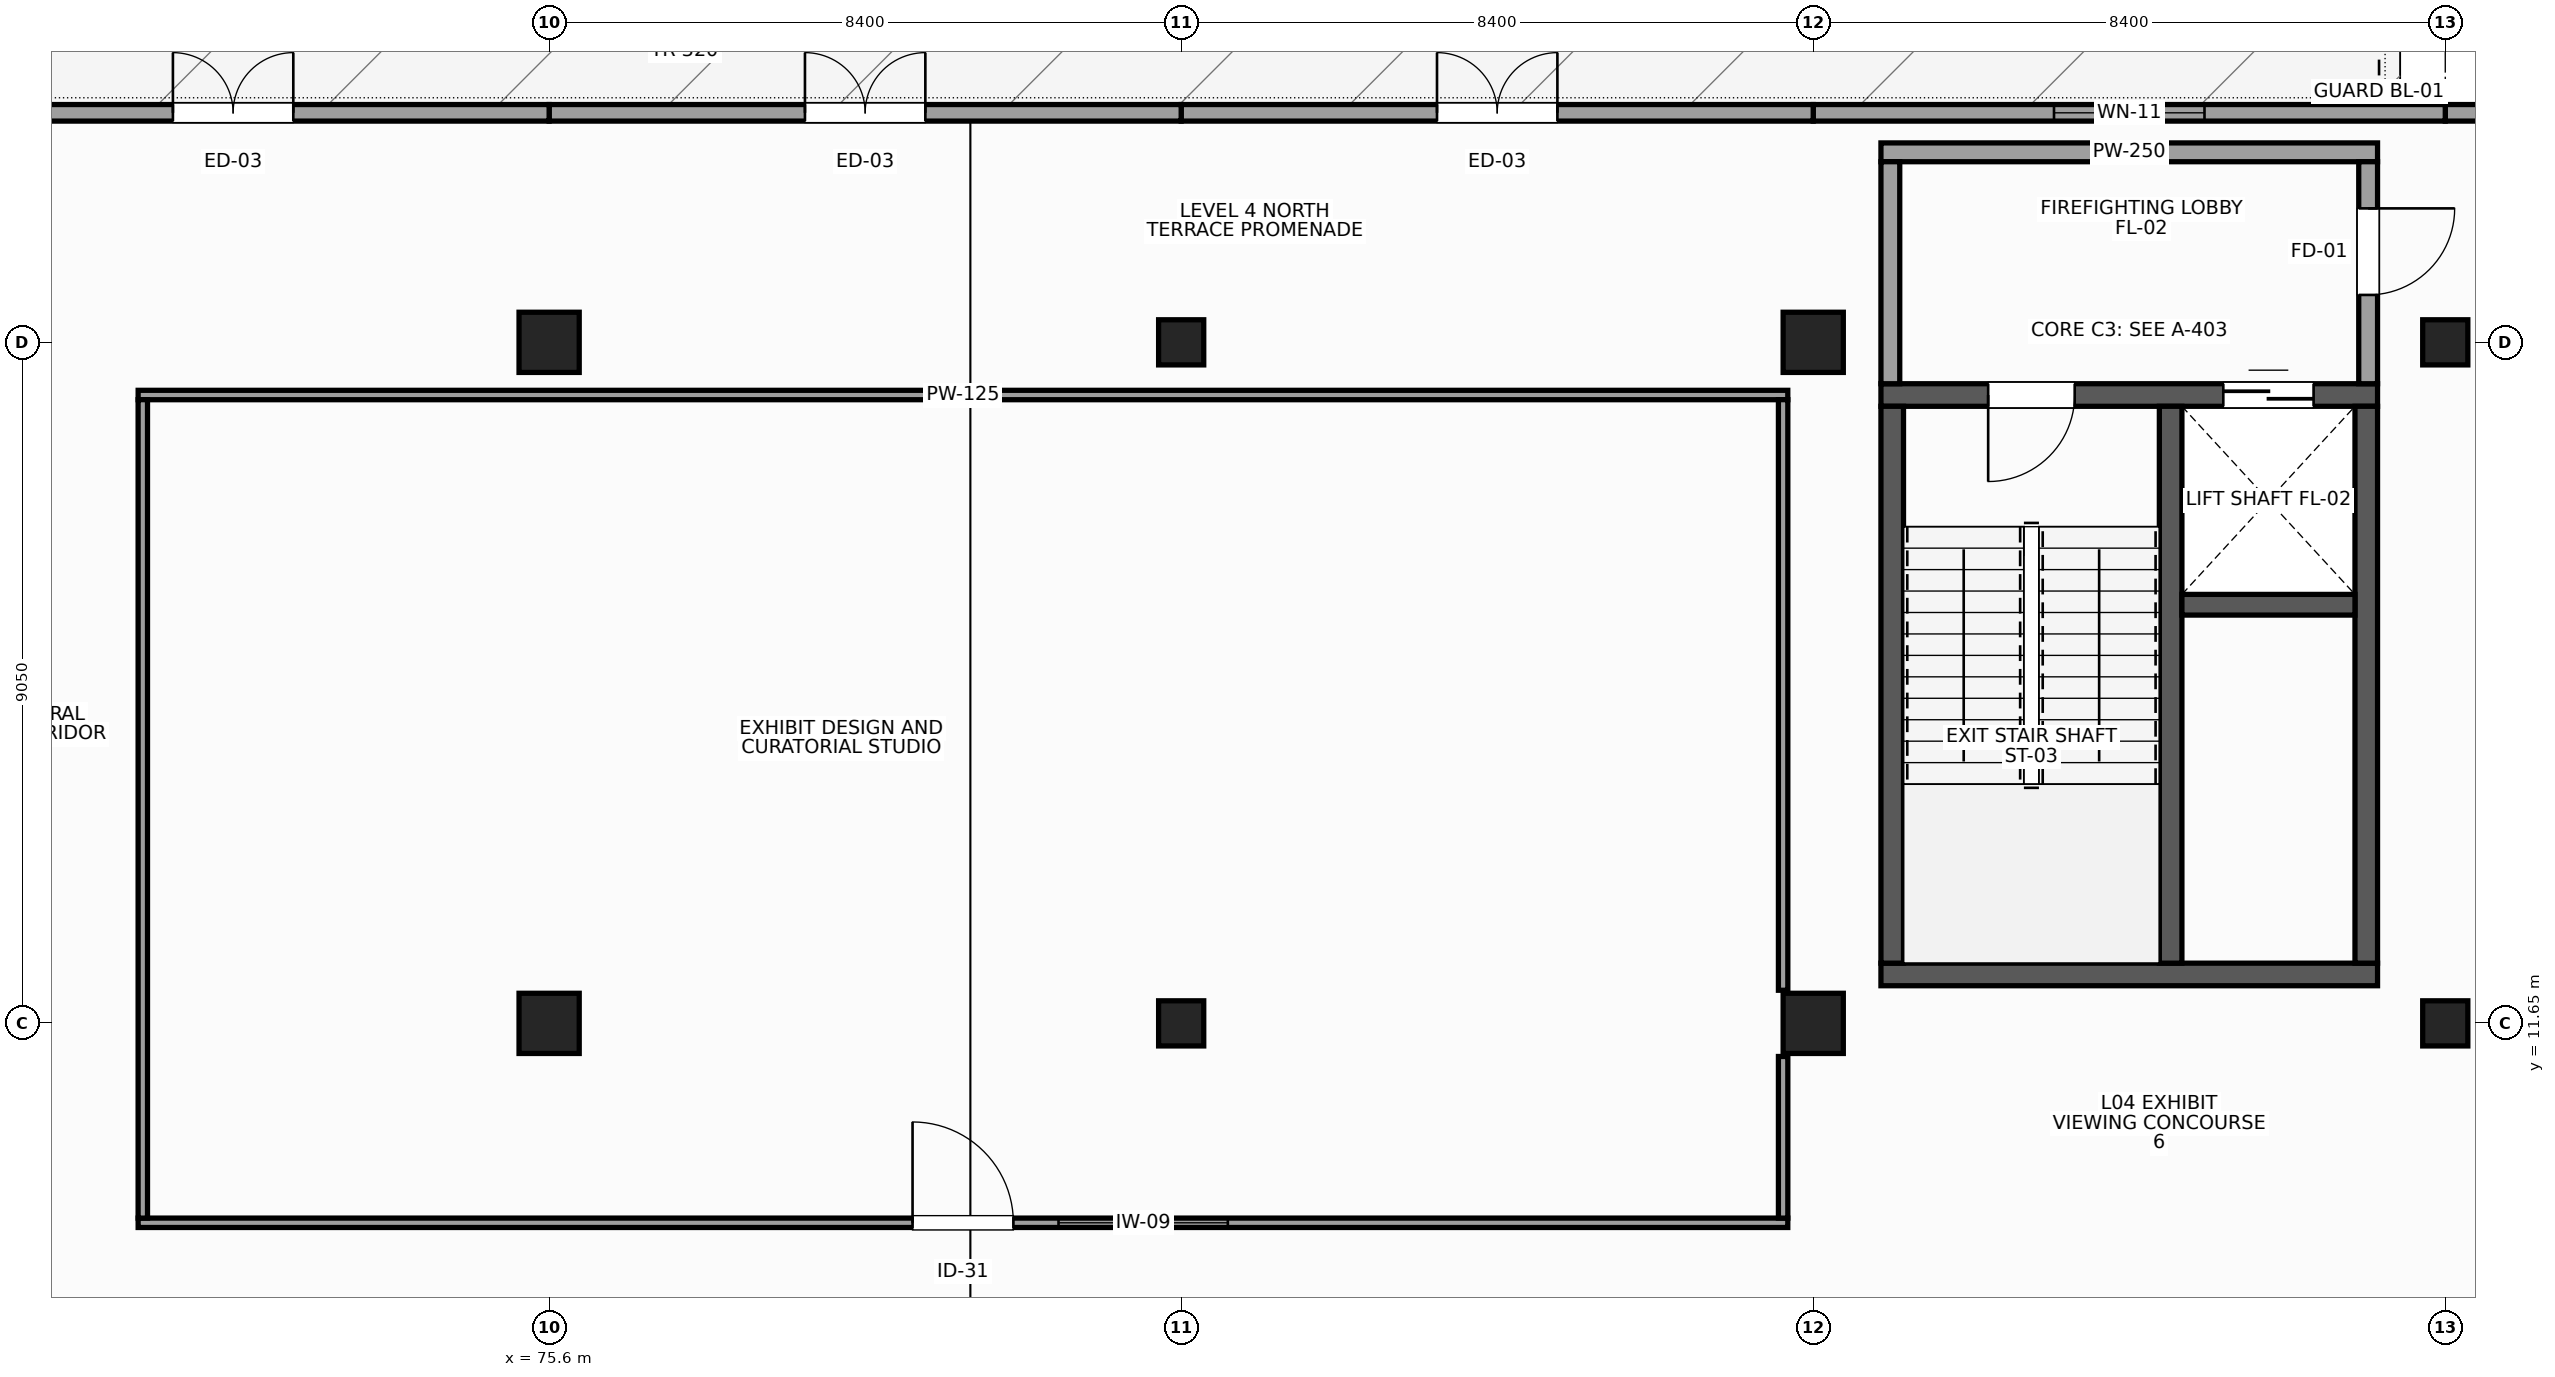
"""IFC4 building model, lengths in metres.
Left out: names, types, materials, properties, quantities, classifications, styles, units other than length and angle.
Written with IfcOpenShell. Run it as: python <this file> out.ifc"""

import sys

from ifc_helpers import new_model, si_unit, direction, frame, frame_2d, origin, origin_2d, place, context, subcontext, project, spatial, rectangle, extrude, element, fill, save


model = new_model("IFC4")
c1 = context("Model", 3, precision=1e-05, world=origin(), true_north=direction((0.0, 1.0)))
c2 = subcontext(c1, "Body", "Model", "MODEL_VIEW")
j1 = project(units=[si_unit("LENGTHUNIT", "METRE"), si_unit("PLANEANGLEUNIT", "RADIAN")], contexts=[c1])
p1 = place(None, origin())
s1 = spatial("IfcSite", under=j1, at=p1, CompositionType="ELEMENT")
p2 = place(p1, origin())
s2 = spatial("IfcBuilding", under=s1, at=p2, CompositionType="ELEMENT")
p3 = place(p2, frame((0.0, 0.0, 20.1)))
s3 = spatial("IfcBuildingStorey", under=s2, at=p3, CompositionType="ELEMENT", Elevation=20.1)
p4 = place(p3, frame((75.6, 11.65, 0.0), z_axis=(0.0, 0.0, 1.0), x_axis=(1.0, 0.0, 0.0)))
e1 = element("IfcColumn", 1, at=p4, inside=s3, PredefinedType="COLUMN", context=c2, shape_type="SweptSolid", body=[
    extrude(rectangle(XDim=0.8, YDim=0.8, at=origin_2d()), origin(), (0.0, 0.0, 1.0), 3.75),
])
p5 = place(p3, frame((75.6, 20.7, 0.0), z_axis=(0.0, 0.0, 1.0), x_axis=(1.0, 0.0, 0.0)))
e2 = element("IfcColumn", 2, at=p5, inside=s3, PredefinedType="COLUMN", context=c2, shape_type="SweptSolid", body=[
    extrude(rectangle(XDim=0.8, YDim=0.8, at=origin_2d()), origin(), (0.0, 0.0, 1.0), 4.2),
])
for number, where, z_axis, x_axis in (
    (3, (84.0, 11.65, 0.0), (0.0, 0.0, 1.0), (1.0, 0.0, 0.0)),
    (4, (84.0, 20.7, 0.0), (0.0, 0.0, 1.0), (1.0, 0.0, 0.0)),
):
    element("IfcColumn", number, at=place(p3, frame(where, z_axis=z_axis, x_axis=x_axis)), inside=s3, PredefinedType="COLUMN", context=c2, shape_type="SweptSolid", body=[
        extrude(rectangle(XDim=0.6, YDim=0.6, at=origin_2d()), origin(), (0.0, 0.0, 1.0), 4.5),
    ])
p6 = place(p3, frame((92.4, 11.65, 0.0), z_axis=(0.0, 0.0, 1.0), x_axis=(1.0, 0.0, 0.0)))
e5 = element("IfcColumn", 5, at=p6, inside=s3, PredefinedType="COLUMN", context=c2, shape_type="SweptSolid", body=[
    extrude(rectangle(XDim=0.8, YDim=0.8, at=origin_2d()), origin(), (0.0, 0.0, 1.0), 3.75),
])
p7 = place(p3, frame((92.4, 20.7, 0.0), z_axis=(0.0, 0.0, 1.0), x_axis=(1.0, 0.0, 0.0)))
e6 = element("IfcColumn", 6, at=p7, inside=s3, PredefinedType="COLUMN", context=c2, shape_type="SweptSolid", body=[
    extrude(rectangle(XDim=0.8, YDim=0.8, at=origin_2d()), origin(), (0.0, 0.0, 1.0), 4.2),
])
for number, where, z_axis, x_axis in (
    (7, (100.8, 11.65, 0.0), (0.0, 0.0, 1.0), (1.0, 0.0, 0.0)),
    (8, (100.8, 20.7, 0.0), (0.0, 0.0, 1.0), (1.0, 0.0, 0.0)),
):
    element("IfcColumn", number, at=place(p3, frame(where, z_axis=z_axis, x_axis=x_axis)), inside=s3, PredefinedType="COLUMN", context=c2, shape_type="SweptSolid", body=[
        extrude(rectangle(XDim=0.6, YDim=0.6, at=origin_2d()), origin(), (0.0, 0.0, 1.0), 4.5),
    ])
p8 = place(p3, frame((109.2, 23.75, 0.0), z_axis=(0.0, 0.0, 1.0), x_axis=(-1.0, 0.0, 0.0)))
e9 = element("IfcWall", 9, at=p8, inside=s3, PredefinedType="STANDARD", context=c2, shape_type="SweptSolid", body=[
    extrude(rectangle(XDim=8.4, YDim=0.22, at=frame_2d((4.2, 0.0))), origin(), (0.0, 0.0, 1.0), 3.428),
])
p9 = place(p8, frame((2.85, 0.0, 0.95)))
e10 = element("IfcOpeningElement", 10, at=p9, cuts=e9, PredefinedType="OPENING", context=c2, shape_type="SweptSolid", body=[
    extrude(rectangle(XDim=2.7, YDim=2.0, at=frame_2d((1.35, 1.0))), frame((0.0, 0.12, 0.0), z_axis=(0.0, -1.0, 0.0), x_axis=(1.0, 0.0, 0.0)), (0.0, 0.0, 1.0), 0.24),
])
p10 = place(p3, frame((100.8, 23.75, 0.0), z_axis=(0.0, 0.0, 1.0), x_axis=(-1.0, 0.0, 0.0)))
e11 = element("IfcWall", 11, at=p10, inside=s3, PredefinedType="STANDARD", context=c2, shape_type="SweptSolid", body=[
    extrude(rectangle(XDim=8.4, YDim=0.22, at=frame_2d((4.2, 0.0))), origin(), (0.0, 0.0, 1.0), 3.428),
])
p11 = place(p10, frame((3.2, 0.0, 0.95)))
e12 = element("IfcOpeningElement", 12, at=p11, cuts=e11, PredefinedType="OPENING", context=c2, shape_type="SweptSolid", body=[
    extrude(rectangle(XDim=2.0, YDim=1.5, at=frame_2d((1.0, 0.75))), frame((0.0, 0.12, 0.0), z_axis=(0.0, -1.0, 0.0), x_axis=(1.0, 0.0, 0.0)), (0.0, 0.0, 1.0), 0.24),
])
p12 = place(p3, frame((92.4, 23.75, 0.0), z_axis=(0.0, 0.0, 1.0), x_axis=(-1.0, 0.0, 0.0)))
e13 = element("IfcWall", 13, at=p12, inside=s3, PredefinedType="STANDARD", context=c2, shape_type="SweptSolid", body=[
    extrude(rectangle(XDim=8.4, YDim=0.22, at=frame_2d((4.2, 0.0))), origin(), (0.0, 0.0, 1.0), 3.428),
])
p13 = place(p12, frame((3.4, 0.0, 0.0)))
e14 = element("IfcOpeningElement", 14, at=p13, cuts=e13, PredefinedType="OPENING", context=c2, shape_type="SweptSolid", body=[
    extrude(rectangle(XDim=1.6, YDim=2.25, at=frame_2d((0.8, 1.125))), frame((0.0, 0.12, 0.0), z_axis=(0.0, -1.0, 0.0), x_axis=(1.0, 0.0, 0.0)), (0.0, 0.0, 1.0), 0.24),
])
p14 = place(p3, frame((84.0, 23.75, 0.0), z_axis=(0.0, 0.0, 1.0), x_axis=(-1.0, 0.0, 0.0)))
e15 = element("IfcWall", 15, at=p14, inside=s3, PredefinedType="STANDARD", context=c2, shape_type="SweptSolid", body=[
    extrude(rectangle(XDim=8.4, YDim=0.22, at=frame_2d((4.2, 0.0))), origin(), (0.0, 0.0, 1.0), 3.428),
])
p15 = place(p14, frame((3.4, 0.0, 0.0)))
e16 = element("IfcOpeningElement", 16, at=p15, cuts=e15, PredefinedType="OPENING", context=c2, shape_type="SweptSolid", body=[
    extrude(rectangle(XDim=1.6, YDim=2.25, at=frame_2d((0.8, 1.125))), frame((0.0, 0.12, 0.0), z_axis=(0.0, -1.0, 0.0), x_axis=(1.0, 0.0, 0.0)), (0.0, 0.0, 1.0), 0.24),
])
p16 = place(p3, frame((75.6, 23.75, 0.0), z_axis=(0.0, 0.0, 1.0), x_axis=(-1.0, 0.0, 0.0)))
e17 = element("IfcWall", 17, at=p16, inside=s3, PredefinedType="STANDARD", context=c2, shape_type="SweptSolid", body=[
    extrude(rectangle(XDim=8.4, YDim=0.22, at=frame_2d((4.2, 0.0))), origin(), (0.0, 0.0, 1.0), 3.428),
])
p17 = place(p16, frame((3.4, 0.0, 0.0)))
e18 = element("IfcOpeningElement", 18, at=p17, cuts=e17, PredefinedType="OPENING", context=c2, shape_type="SweptSolid", body=[
    extrude(rectangle(XDim=1.6, YDim=2.25, at=frame_2d((0.8, 1.125))), frame((0.0, 0.12, 0.0), z_axis=(0.0, -1.0, 0.0), x_axis=(1.0, 0.0, 0.0)), (0.0, 0.0, 1.0), 0.24),
])
p18 = place(p3, frame((93.3, 12.3, 0.0), z_axis=(0.0, 0.0, 1.0), x_axis=(1.0, 0.0, 0.0)))
e19 = element("IfcWall", 19, at=p18, inside=s3, PredefinedType="SHEAR", context=c2, shape_type="SweptSolid", body=[
    extrude(rectangle(XDim=6.6, YDim=0.3, at=frame_2d((3.3, 0.0))), origin(), (0.0, 0.0, 1.0), 4.2),
])
p19 = place(p3, frame((93.3, 20.0, 0.0), z_axis=(0.0, 0.0, 1.0), x_axis=(1.0, 0.0, 0.0)))
e20 = element("IfcWall", 20, at=p19, inside=s3, PredefinedType="SHEAR", context=c2, shape_type="SweptSolid", body=[
    extrude(rectangle(XDim=6.6, YDim=0.3, at=frame_2d((3.3, 0.0))), origin(), (0.0, 0.0, 1.0), 4.2),
])
p20 = place(p19, frame((1.425, 0.0, 0.0)))
e21 = element("IfcOpeningElement", 21, at=p20, cuts=e20, PredefinedType="OPENING", context=c2, shape_type="SweptSolid", body=[
    extrude(rectangle(XDim=1.15, YDim=2.2, at=frame_2d((0.575, 1.1))), frame((0.0, 0.16, 0.0), z_axis=(0.0, -1.0, 0.0), x_axis=(1.0, 0.0, 0.0)), (0.0, 0.0, 1.0), 0.32),
])
p21 = place(p19, frame((4.55, 0.0, 0.0)))
e22 = element("IfcOpeningElement", 22, at=p21, cuts=e20, PredefinedType="OPENING", context=c2, shape_type="SweptSolid", body=[
    extrude(rectangle(XDim=1.2, YDim=2.15, at=frame_2d((0.6, 1.075))), frame((0.0, 0.16, 0.0), z_axis=(0.0, -1.0, 0.0), x_axis=(1.0, 0.0, 0.0)), (0.0, 0.0, 1.0), 0.32),
])
for number, where, z_axis, x_axis in (
    (23, (93.45, 12.45, 0.0), (0.0, 0.0, 1.0), (0.0, 1.0, 0.0)),
    (24, (99.75, 12.45, 0.0), (0.0, 0.0, 1.0), (0.0, 1.0, 0.0)),
    (25, (97.15, 12.45, 0.0), (0.0, 0.0, 1.0), (0.0, 1.0, 0.0)),
):
    element("IfcWall", number, at=place(p3, frame(where, z_axis=z_axis, x_axis=x_axis)), inside=s3, PredefinedType="SHEAR", context=c2, shape_type="SweptSolid", body=[
        extrude(rectangle(XDim=7.4, YDim=0.3, at=frame_2d((3.7, 0.0))), origin(), (0.0, 0.0, 1.0), 4.2),
    ])
p22 = place(p3, frame((97.3, 17.213, 0.0), z_axis=(0.0, 0.0, 1.0), x_axis=(1.0, 0.0, 0.0)))
e26 = element("IfcWall", 26, at=p22, inside=s3, PredefinedType="SHEAR", context=c2, shape_type="SweptSolid", body=[
    extrude(rectangle(XDim=2.3, YDim=0.275, at=frame_2d((1.15, 0.0))), origin(), (0.0, 0.0, 1.0), 4.2),
])
p23 = place(p3, frame((93.3, 23.225, 0.0), z_axis=(0.0, 0.0, 1.0), x_axis=(1.0, 0.0, 0.0)))
e27 = element("IfcWall", 27, at=p23, inside=s3, PredefinedType="PARTITIONING", context=c2, shape_type="SweptSolid", body=[
    extrude(rectangle(XDim=6.6, YDim=0.25, at=frame_2d((3.3, 0.0))), origin(), (0.0, 0.0, 1.0), 4.2),
])
p24 = place(p3, frame((93.425, 20.15, 0.0), z_axis=(0.0, 0.0, 1.0), x_axis=(0.0, 1.0, 0.0)))
e28 = element("IfcWall", 28, at=p24, inside=s3, PredefinedType="PARTITIONING", context=c2, shape_type="SweptSolid", body=[
    extrude(rectangle(XDim=2.95, YDim=0.25, at=frame_2d((1.475, 0.0))), origin(), (0.0, 0.0, 1.0), 4.2),
])
p25 = place(p3, frame((99.775, 20.15, 0.0), z_axis=(0.0, 0.0, 1.0), x_axis=(0.0, 1.0, 0.0)))
e29 = element("IfcWall", 29, at=p25, inside=s3, PredefinedType="PARTITIONING", context=c2, shape_type="SweptSolid", body=[
    extrude(rectangle(XDim=2.95, YDim=0.25, at=frame_2d((1.475, 0.0))), origin(), (0.0, 0.0, 1.0), 3.783),
])
p26 = place(p25, frame((1.18, 0.0, 0.0)))
e30 = element("IfcOpeningElement", 30, at=p26, cuts=e29, PredefinedType="OPENING", context=c2, shape_type="SweptSolid", body=[
    extrude(rectangle(XDim=1.15, YDim=2.2, at=frame_2d((0.575, 1.1))), frame((0.0, 0.135, 0.0), z_axis=(0.0, -1.0, 0.0), x_axis=(1.0, 0.0, 0.0)), (0.0, 0.0, 1.0), 0.27),
])
p27 = place(p3, frame((70.138, 9.0, 0.0), z_axis=(0.0, 0.0, 1.0), x_axis=(1.0, 0.0, 0.0)))
e31 = element("IfcWall", 31, at=p27, inside=s3, PredefinedType="PARTITIONING", context=c2, shape_type="SweptSolid", body=[
    extrude(rectangle(XDim=21.924, YDim=0.125, at=frame_2d((10.962, 0.0))), origin(), (0.0, 0.0, 1.0), 4.2),
])
p28 = place(p27, frame((10.292, 0.0, 0.0)))
e32 = element("IfcOpeningElement", 32, at=p28, cuts=e31, PredefinedType="OPENING", context=c2, shape_type="SweptSolid", body=[
    extrude(rectangle(XDim=1.34, YDim=2.32, at=frame_2d((0.67, 1.16))), frame((0.0, 0.073, 0.0), z_axis=(0.0, -1.0, 0.0), x_axis=(1.0, 0.0, 0.0)), (0.0, 0.0, 1.0), 0.145),
])
p29 = place(p27, frame((12.232, 0.0, 1.05)))
e33 = element("IfcOpeningElement", 33, at=p29, cuts=e31, PredefinedType="OPENING", context=c2, shape_type="SweptSolid", body=[
    extrude(rectangle(XDim=2.25, YDim=1.6, at=frame_2d((1.125, 0.8))), frame((0.0, 0.073, 0.0), z_axis=(0.0, -1.0, 0.0), x_axis=(1.0, 0.0, 0.0)), (0.0, 0.0, 1.0), 0.145),
])
p30 = place(p3, frame((70.138, 20.0, 0.0), z_axis=(0.0, 0.0, 1.0), x_axis=(1.0, 0.0, 0.0)))
e34 = element("IfcWall", 34, at=p30, inside=s3, PredefinedType="PARTITIONING", context=c2, shape_type="SweptSolid", body=[
    extrude(rectangle(XDim=21.924, YDim=0.125, at=frame_2d((10.962, 0.0))), origin(), (0.0, 0.0, 1.0), 3.428),
])
p31 = place(p3, frame((92.0, 9.062, 0.0), z_axis=(0.0, 0.0, 1.0), x_axis=(0.0, 1.0, 0.0)))
e35 = element("IfcWall", 35, at=p31, inside=s3, PredefinedType="PARTITIONING", context=c2, shape_type="SweptSolid", body=[
    extrude(rectangle(XDim=2.148, YDim=0.125, at=frame_2d((1.074, 0.0))), origin(), (0.0, 0.0, 1.0), 4.2),
])
p32 = place(p3, frame((92.0, 12.09, 0.0), z_axis=(0.0, 0.0, 1.0), x_axis=(0.0, 1.0, 0.0)))
e36 = element("IfcWall", 36, at=p32, inside=s3, PredefinedType="PARTITIONING", context=c2, shape_type="SweptSolid", body=[
    extrude(rectangle(XDim=7.848, YDim=0.125, at=frame_2d((3.924, 0.0))), origin(), (0.0, 0.0, 1.0), 3.783),
])
p33 = place(p3, frame((70.2, 9.062, 0.0), z_axis=(0.0, 0.0, 1.0), x_axis=(0.0, 1.0, 0.0)))
e37 = element("IfcWall", 37, at=p33, inside=s3, PredefinedType="PARTITIONING", context=c2, shape_type="SweptSolid", body=[
    extrude(rectangle(XDim=10.876, YDim=0.125, at=frame_2d((5.438, 0.0))), origin(), (0.0, 0.0, 1.0), 3.75),
])
p34 = place(p11, origin())
e38 = element("IfcWindow", 38, at=p34, inside=s3, PartitioningType="SINGLE_PANEL", PredefinedType="WINDOW", context=c2, shape_type="SweptSolid", body=[
    extrude(rectangle(XDim=2.0, YDim=1.5, at=frame_2d((1.0, 0.75))), frame((0.0, 0.03, 0.0), z_axis=(0.0, -1.0, 0.0), x_axis=(1.0, 0.0, 0.0)), (0.0, 0.0, 1.0), 0.06),
])
fill(e12, e38)
p35 = place(p13, frame((1.6, 0.0, 0.0), z_axis=(0.0, 0.0, 1.0), x_axis=(-1.0, 0.0, 0.0)))
e39 = element("IfcDoor", 39, at=p35, inside=s3, OperationType="DOUBLE_DOOR_SINGLE_SWING", PredefinedType="DOOR", context=c2, shape_type="SweptSolid", body=[
    extrude(rectangle(XDim=1.6, YDim=2.25, at=frame_2d((0.8, 1.125))), frame((0.0, 0.025, 0.0), z_axis=(0.0, -1.0, 0.0), x_axis=(1.0, 0.0, 0.0)), (0.0, 0.0, 1.0), 0.05),
])
fill(e14, e39)
p36 = place(p15, frame((1.6, 0.0, 0.0), z_axis=(0.0, 0.0, 1.0), x_axis=(-1.0, 0.0, 0.0)))
e40 = element("IfcDoor", 40, at=p36, inside=s3, OperationType="DOUBLE_DOOR_SINGLE_SWING", PredefinedType="DOOR", context=c2, shape_type="SweptSolid", body=[
    extrude(rectangle(XDim=1.6, YDim=2.25, at=frame_2d((0.8, 1.125))), frame((0.0, 0.025, 0.0), z_axis=(0.0, -1.0, 0.0), x_axis=(1.0, 0.0, 0.0)), (0.0, 0.0, 1.0), 0.05),
])
fill(e16, e40)
p37 = place(p17, frame((1.6, 0.0, 0.0), z_axis=(0.0, 0.0, 1.0), x_axis=(-1.0, 0.0, 0.0)))
e41 = element("IfcDoor", 41, at=p37, inside=s3, OperationType="DOUBLE_DOOR_SINGLE_SWING", PredefinedType="DOOR", context=c2, shape_type="SweptSolid", body=[
    extrude(rectangle(XDim=1.6, YDim=2.25, at=frame_2d((0.8, 1.125))), frame((0.0, 0.025, 0.0), z_axis=(0.0, -1.0, 0.0), x_axis=(1.0, 0.0, 0.0)), (0.0, 0.0, 1.0), 0.05),
])
fill(e18, e41)
p38 = place(p20, frame((1.15, 0.0, 0.0), z_axis=(0.0, 0.0, 1.0), x_axis=(-1.0, 0.0, 0.0)))
e42 = element("IfcDoor", 42, at=p38, inside=s3, OperationType="SINGLE_SWING_RIGHT", PredefinedType="DOOR", context=c2, shape_type="SweptSolid", body=[
    extrude(rectangle(XDim=1.15, YDim=2.2, at=frame_2d((0.575, 1.1))), frame((0.0, 0.025, 0.0), z_axis=(0.0, -1.0, 0.0), x_axis=(1.0, 0.0, 0.0)), (0.0, 0.0, 1.0), 0.05),
])
fill(e21, e42)
p39 = place(p21, origin())
e43 = element("IfcDoor", 43, at=p39, inside=s3, OperationType="DOUBLE_DOOR_SLIDING", PredefinedType="DOOR", context=c2, shape_type="SweptSolid", body=[
    extrude(rectangle(XDim=1.2, YDim=2.15, at=frame_2d((0.6, 1.075))), frame((0.0, 0.025, 0.0), z_axis=(0.0, -1.0, 0.0), x_axis=(1.0, 0.0, 0.0)), (0.0, 0.0, 1.0), 0.05),
])
fill(e22, e43)
p40 = place(p26, frame((1.15, 0.0, 0.0), z_axis=(0.0, 0.0, 1.0), x_axis=(-1.0, 0.0, 0.0)))
e44 = element("IfcDoor", 44, at=p40, inside=s3, OperationType="SINGLE_SWING_LEFT", PredefinedType="DOOR", context=c2, shape_type="SweptSolid", body=[
    extrude(rectangle(XDim=1.15, YDim=2.2, at=frame_2d((0.575, 1.1))), frame((0.0, 0.025, 0.0), z_axis=(0.0, -1.0, 0.0), x_axis=(1.0, 0.0, 0.0)), (0.0, 0.0, 1.0), 0.05),
])
fill(e30, e44)
p41 = place(p28, origin())
e45 = element("IfcDoor", 45, at=p41, inside=s3, OperationType="SINGLE_SWING_LEFT", PredefinedType="DOOR", context=c2, shape_type="SweptSolid", body=[
    extrude(rectangle(XDim=1.34, YDim=2.32, at=frame_2d((0.67, 1.16))), frame((0.0, 0.025, 0.0), z_axis=(0.0, -1.0, 0.0), x_axis=(1.0, 0.0, 0.0)), (0.0, 0.0, 1.0), 0.05),
])
fill(e32, e45)
p42 = place(p29, origin())
e46 = element("IfcWindow", 46, at=p42, inside=s3, PartitioningType="SINGLE_PANEL", PredefinedType="WINDOW", context=c2, shape_type="SweptSolid", body=[
    extrude(rectangle(XDim=2.25, YDim=1.6, at=frame_2d((1.125, 0.8))), frame((0.0, 0.03, 0.0), z_axis=(0.0, -1.0, 0.0), x_axis=(1.0, 0.0, 0.0)), (0.0, 0.0, 1.0), 0.06),
])
fill(e33, e46)
save(model, sys.argv[1])
